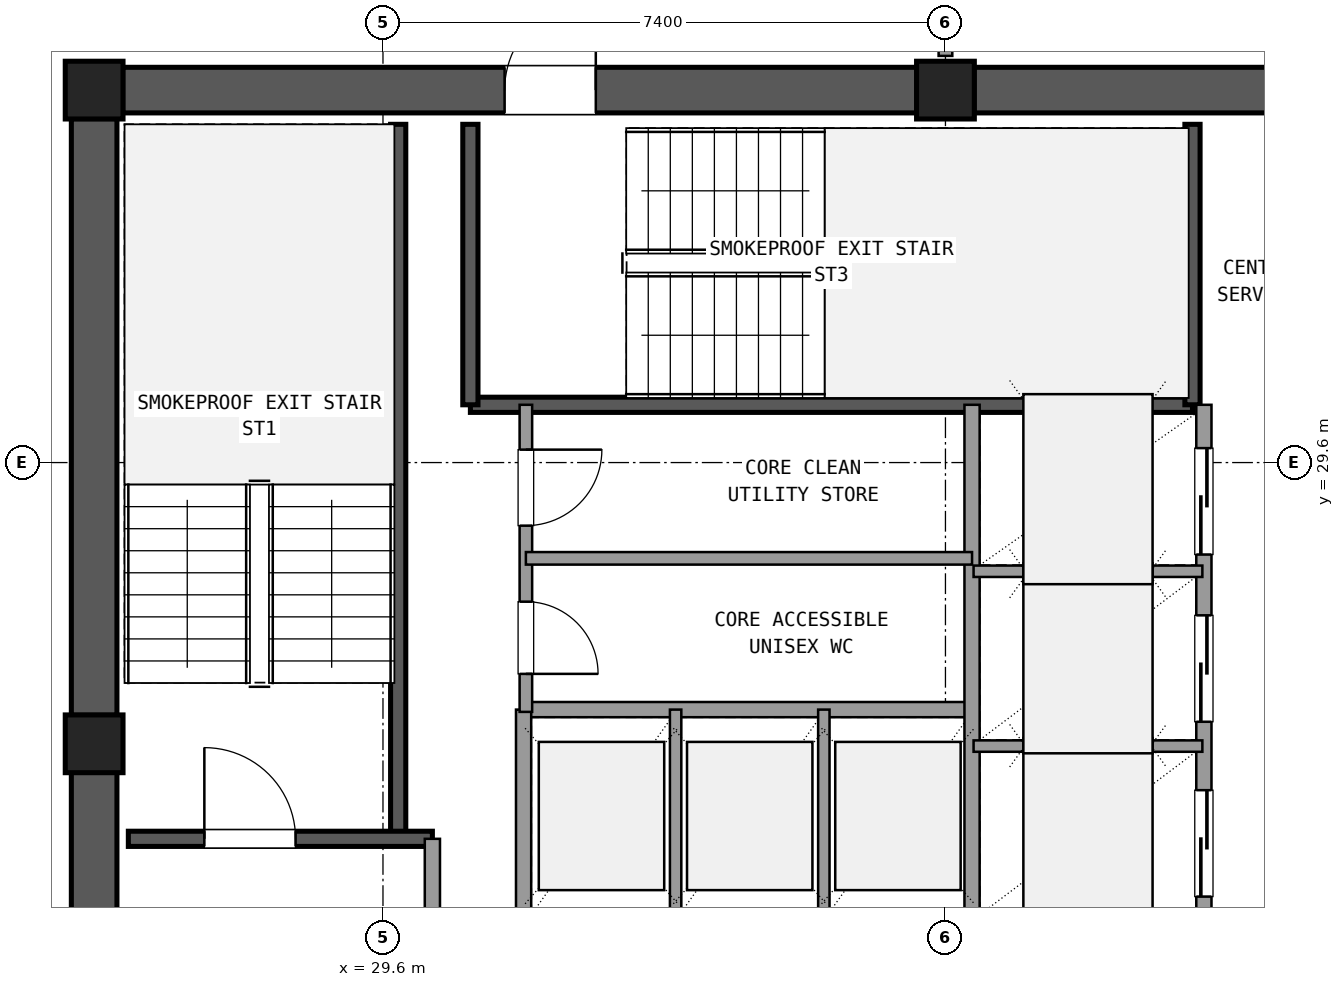
"""IFC4 building model, lengths in metres.
Left out: names, types, materials, properties, quantities, classifications, styles, units other than length and angle.
Written with IfcOpenShell. Run it as: python <this file> out.ifc"""

import sys

from ifc_helpers import new_model, si_unit, direction, frame, frame_2d, origin, origin_2d, place, context, subcontext, project, spatial, rectangle, extrude, element, fill, save


model = new_model("IFC4")
c1 = context("Model", 3, precision=1e-05, world=origin(), true_north=direction((0.0, 1.0)))
c2 = subcontext(c1, "Body", "Model", "MODEL_VIEW")
j1 = project(units=[si_unit("LENGTHUNIT", "METRE"), si_unit("PLANEANGLEUNIT", "RADIAN")], contexts=[c1])
p1 = place(None, origin())
s1 = spatial("IfcSite", under=j1, at=p1, CompositionType="ELEMENT")
p2 = place(p1, origin())
s2 = spatial("IfcBuilding", under=s1, at=p2, CompositionType="ELEMENT")
p3 = place(p2, frame((0.0, 0.0, 268.02)))
s3 = spatial("IfcBuildingStorey", under=s2, at=p3, CompositionType="ELEMENT", Elevation=268.02)
for number, where, z_axis, x_axis in (
    (1, (37.0, 34.5, 0.0), (0.0, 0.0, 1.0), (1.0, 0.0, 0.0)),
    (2, (25.8, 34.5, 0.0), (0.0, 0.0, 1.0), (1.0, 0.0, 0.0)),
    (3, (25.8, 25.9, 0.0), (0.0, 0.0, 1.0), (1.0, 0.0, 0.0)),
):
    element("IfcColumn", number, at=place(p3, frame(where, z_axis=z_axis, x_axis=x_axis)), inside=s3, PredefinedType="COLUMN", context=c2, shape_type="SweptSolid", body=[
        extrude(rectangle(XDim=0.76, YDim=0.76, at=origin_2d()), origin(), (0.0, 0.0, 1.0), 3.6),
    ])
p4 = place(p3, frame((47.825, 34.5, 0.0), z_axis=(0.0, 0.0, 1.0), x_axis=(-1.0, 0.0, 0.0)))
e4 = element("IfcWall", 4, at=p4, inside=s3, PredefinedType="SHEAR", context=c2, shape_type="SweptSolid", body=[
    extrude(rectangle(XDim=10.45, YDim=0.6, at=frame_2d((5.225, 0.0))), origin(), (0.0, 0.0, 1.0), 3.32),
])
p5 = place(p4, frame((4.725, 0.0, 0.0)))
e5 = element("IfcOpeningElement", 5, at=p5, cuts=e4, PredefinedType="OPENING", context=c2, shape_type="SweptSolid", body=[
    extrude(rectangle(XDim=1.6, YDim=2.2, at=frame_2d((0.8, 1.1))), frame((0.0, 0.31, 0.0), z_axis=(0.0, -1.0, 0.0), x_axis=(1.0, 0.0, 0.0)), (0.0, 0.0, 1.0), 0.62),
])
p6 = place(p3, frame((36.625, 34.5, 0.0), z_axis=(0.0, 0.0, 1.0), x_axis=(-1.0, 0.0, 0.0)))
e6 = element("IfcWall", 6, at=p6, inside=s3, PredefinedType="SHEAR", context=c2, shape_type="SweptSolid", body=[
    extrude(rectangle(XDim=10.45, YDim=0.6, at=frame_2d((5.225, 0.0))), origin(), (0.0, 0.0, 1.0), 3.32),
])
p7 = place(p6, frame((4.225, 0.0, 0.0)))
e7 = element("IfcOpeningElement", 7, at=p7, cuts=e6, PredefinedType="OPENING", context=c2, shape_type="SweptSolid", body=[
    extrude(rectangle(XDim=1.2, YDim=2.15, at=frame_2d((0.6, 1.075))), frame((0.0, 0.31, 0.0), z_axis=(0.0, -1.0, 0.0), x_axis=(1.0, 0.0, 0.0)), (0.0, 0.0, 1.0), 0.62),
])
p8 = place(p3, frame((25.8, 34.125, 0.0), z_axis=(0.0, 0.0, 1.0), x_axis=(0.0, -1.0, 0.0)))
e8 = element("IfcWall", 8, at=p8, inside=s3, PredefinedType="SHEAR", context=c2, shape_type="SweptSolid", body=[
    extrude(rectangle(XDim=7.85, YDim=0.6, at=frame_2d((3.925, 0.0))), origin(), (0.0, 0.0, 1.0), 3.32),
])
p9 = place(p3, frame((25.8, 25.525, 0.0), z_axis=(0.0, 0.0, 1.0), x_axis=(0.0, -1.0, 0.0)))
e9 = element("IfcWall", 9, at=p9, inside=s3, PredefinedType="SHEAR", context=c2, shape_type="SweptSolid", body=[
    extrude(rectangle(XDim=7.85, YDim=0.6, at=frame_2d((3.925, 0.0))), origin(), (0.0, 0.0, 1.0), 3.32),
])
p10 = place(p9, frame((2.275, 0.0, 0.0)))
e10 = element("IfcOpeningElement", 10, at=p10, cuts=e9, PredefinedType="OPENING", context=c2, shape_type="SweptSolid", body=[
    extrude(rectangle(XDim=1.2, YDim=2.15, at=frame_2d((0.6, 1.075))), frame((0.0, 0.31, 0.0), z_axis=(0.0, -1.0, 0.0), x_axis=(1.0, 0.0, 0.0)), (0.0, 0.0, 1.0), 0.62),
])
p11 = place(p3, frame((29.8, 24.65, 0.0), z_axis=(0.0, 0.0, 1.0), x_axis=(0.0, 1.0, 0.0)))
e11 = element("IfcWall", 11, at=p11, inside=s3, PredefinedType="SHEAR", context=c2, shape_type="SweptSolid", body=[
    extrude(rectangle(XDim=9.4, YDim=0.2, at=frame_2d((4.7, 0.0))), origin(), (0.0, 0.0, 1.0), 3.32),
])
p12 = place(p3, frame((26.25, 24.65, 0.0), z_axis=(0.0, 0.0, 1.0), x_axis=(1.0, 0.0, 0.0)))
e12 = element("IfcWall", 12, at=p12, inside=s3, PredefinedType="SHEAR", context=c2, shape_type="SweptSolid", body=[
    extrude(rectangle(XDim=4.0, YDim=0.2, at=frame_2d((2.0, 0.0))), origin(), (0.0, 0.0, 1.0), 3.32),
])
p13 = place(p12, frame((1.0, 0.0, 0.0)))
e13 = element("IfcOpeningElement", 13, at=p13, cuts=e12, PredefinedType="OPENING", context=c2, shape_type="SweptSolid", body=[
    extrude(rectangle(XDim=1.2, YDim=2.15, at=frame_2d((0.6, 1.075))), frame((0.0, 0.11, 0.0), z_axis=(0.0, -1.0, 0.0), x_axis=(1.0, 0.0, 0.0)), (0.0, 0.0, 1.0), 0.22),
])
p14 = place(p3, frame((30.75, 30.36, 0.0), z_axis=(0.0, 0.0, 1.0), x_axis=(1.0, 0.0, 0.0)))
e14 = element("IfcWall", 14, at=p14, inside=s3, PredefinedType="SHEAR", context=c2, shape_type="SweptSolid", body=[
    extrude(rectangle(XDim=9.5, YDim=0.2, at=frame_2d((4.75, 0.0))), origin(), (0.0, 0.0, 1.0), 3.32),
])
for number, where, z_axis, x_axis in (
    (15, (30.75, 30.36, 0.0), (0.0, 0.0, 1.0), (0.0, 1.0, 0.0)),
    (16, (40.25, 30.36, 0.0), (0.0, 0.0, 1.0), (0.0, 1.0, 0.0)),
):
    element("IfcWall", number, at=place(p3, frame(where, z_axis=z_axis, x_axis=x_axis)), inside=s3, PredefinedType="SHEAR", context=c2, shape_type="SweptSolid", body=[
        extrude(rectangle(XDim=3.69, YDim=0.2, at=frame_2d((1.845, 0.0))), origin(), (0.0, 0.0, 1.0), 3.32),
    ])
p15 = place(p3, frame((30.25, 17.75, 0.0), z_axis=(0.0, 0.0, 1.0), x_axis=(0.0, 1.0, 0.0)))
e17 = element("IfcWall", 17, at=p15, inside=s3, PredefinedType="SOLIDWALL", context=c2, shape_type="SweptSolid", body=[
    extrude(rectangle(XDim=6.9, YDim=0.2, at=frame_2d((3.45, 0.0))), origin(), (0.0, 0.0, 1.0), 2.61),
])
p16 = place(p15, frame((4.15, 0.0, 0.0)))
e18 = element("IfcOpeningElement", 18, at=p16, cuts=e17, PredefinedType="OPENING", context=c2, shape_type="SweptSolid", body=[
    extrude(rectangle(XDim=1.2, YDim=2.15, at=frame_2d((0.6, 1.075))), frame((0.0, 0.11, 0.0), z_axis=(0.0, -1.0, 0.0), x_axis=(1.0, 0.0, 0.0)), (0.0, 0.0, 1.0), 0.22),
])
p17 = place(p3, frame((31.45, 26.35, 0.0), z_axis=(0.0, 0.0, 1.0), x_axis=(1.0, 0.0, 0.0)))
e19 = element("IfcWall", 19, at=p17, inside=s3, PredefinedType="SOLIDWALL", context=c2, shape_type="SweptSolid", body=[
    extrude(rectangle(XDim=5.9, YDim=0.2, at=frame_2d((2.95, 0.0))), origin(), (0.0, 0.0, 1.0), 2.61),
])
p18 = place(p3, frame((31.45, 23.54, 0.0), z_axis=(0.0, 0.0, 1.0), x_axis=(0.0, 1.0, 0.0)))
e20 = element("IfcWall", 20, at=p18, inside=s3, PredefinedType="SOLIDWALL", context=c2, shape_type="SweptSolid", body=[
    extrude(rectangle(XDim=2.81, YDim=0.2, at=frame_2d((1.405, 0.0))), origin(), (0.0, 0.0, 1.0), 2.61),
])
for number, where, z_axis, x_axis in (
    (21, (33.45, 23.54, 0.0), (0.0, 0.0, 1.0), (0.0, 1.0, 0.0)),
    (22, (35.4, 23.54, 0.0), (0.0, 0.0, 1.0), (0.0, 1.0, 0.0)),
):
    element("IfcWall", number, at=place(p3, frame(where, z_axis=z_axis, x_axis=x_axis)), inside=s3, PredefinedType="PARTITIONING", context=c2, shape_type="SweptSolid", body=[
        extrude(rectangle(XDim=2.81, YDim=0.15, at=frame_2d((1.405, 0.0))), origin(), (0.0, 0.0, 1.0), 2.61),
    ])
p19 = place(p3, frame((37.35, 23.54, 0.0), z_axis=(0.0, 0.0, 1.0), x_axis=(0.0, 1.0, 0.0)))
e23 = element("IfcWall", 23, at=p19, inside=s3, PredefinedType="SOLIDWALL", context=c2, shape_type="SweptSolid", body=[
    extrude(rectangle(XDim=6.82, YDim=0.2, at=frame_2d((3.41, 0.0))), origin(), (0.0, 0.0, 1.0), 2.61),
])
p20 = place(p3, frame((40.4, 23.54, 0.0), z_axis=(0.0, 0.0, 1.0), x_axis=(0.0, 1.0, 0.0)))
e24 = element("IfcWall", 24, at=p20, inside=s3, PredefinedType="SOLIDWALL", context=c2, shape_type="SweptSolid", body=[
    extrude(rectangle(XDim=6.82, YDim=0.2, at=frame_2d((3.41, 0.0))), origin(), (0.0, 0.0, 1.0), 2.61),
])
p21 = place(p20, frame((0.35, 0.0, 0.0)))
e25 = element("IfcOpeningElement", 25, at=p21, cuts=e24, PredefinedType="OPENING", context=c2, shape_type="SweptSolid", body=[
    extrude(rectangle(XDim=1.4, YDim=2.2, at=frame_2d((0.7, 1.1))), frame((0.0, 0.11, 0.0), z_axis=(0.0, -1.0, 0.0), x_axis=(1.0, 0.0, 0.0)), (0.0, 0.0, 1.0), 0.22),
])
p22 = place(p20, frame((2.65, 0.0, 0.0)))
e26 = element("IfcOpeningElement", 26, at=p22, cuts=e24, PredefinedType="OPENING", context=c2, shape_type="SweptSolid", body=[
    extrude(rectangle(XDim=1.4, YDim=2.2, at=frame_2d((0.7, 1.1))), frame((0.0, 0.11, 0.0), z_axis=(0.0, -1.0, 0.0), x_axis=(1.0, 0.0, 0.0)), (0.0, 0.0, 1.0), 0.22),
])
p23 = place(p20, frame((4.85, 0.0, 0.0)))
e27 = element("IfcOpeningElement", 27, at=p23, cuts=e24, PredefinedType="OPENING", context=c2, shape_type="SweptSolid", body=[
    extrude(rectangle(XDim=1.4, YDim=2.2, at=frame_2d((0.7, 1.1))), frame((0.0, 0.11, 0.0), z_axis=(0.0, -1.0, 0.0), x_axis=(1.0, 0.0, 0.0)), (0.0, 0.0, 1.0), 0.22),
])
for number, where, z_axis, x_axis in (
    (28, (37.37, 25.87, 0.0), (0.0, 0.0, 1.0), (1.0, 0.0, 0.0)),
    (29, (37.37, 28.17, 0.0), (0.0, 0.0, 1.0), (1.0, 0.0, 0.0)),
):
    element("IfcWall", number, at=place(p3, frame(where, z_axis=z_axis, x_axis=x_axis)), inside=s3, PredefinedType="PARTITIONING", context=c2, shape_type="SweptSolid", body=[
        extrude(rectangle(XDim=3.01, YDim=0.15, at=frame_2d((1.505, 0.0))), origin(), (0.0, 0.0, 1.0), 2.61),
    ])
p24 = place(p3, frame((31.48, 26.32, 0.0), z_axis=(0.0, 0.0, 1.0), x_axis=(0.0, 1.0, 0.0)))
e30 = element("IfcWall", 30, at=p24, inside=s3, PredefinedType="PLUMBINGWALL", context=c2, shape_type="SweptSolid", body=[
    extrude(rectangle(XDim=4.04, YDim=0.165, at=frame_2d((2.02, 0.0))), origin(), (0.0, 0.0, 1.0), 2.61),
])
p25 = place(p24, frame((0.5, 0.0, 0.0)))
e31 = element("IfcOpeningElement", 31, at=p25, cuts=e30, PredefinedType="OPENING", context=c2, shape_type="SweptSolid", body=[
    extrude(rectangle(XDim=0.95, YDim=2.1, at=frame_2d((0.475, 1.05))), frame((0.0, 0.093, 0.0), z_axis=(0.0, -1.0, 0.0), x_axis=(1.0, 0.0, 0.0)), (0.0, 0.0, 1.0), 0.185),
])
p26 = place(p24, frame((2.45, 0.0, 0.0)))
e32 = element("IfcOpeningElement", 32, at=p26, cuts=e30, PredefinedType="OPENING", context=c2, shape_type="SweptSolid", body=[
    extrude(rectangle(XDim=1.0, YDim=2.15, at=frame_2d((0.5, 1.075))), frame((0.0, 0.093, 0.0), z_axis=(0.0, -1.0, 0.0), x_axis=(1.0, 0.0, 0.0)), (0.0, 0.0, 1.0), 0.185),
])
p27 = place(p3, frame((31.48, 28.34, 0.0), z_axis=(0.0, 0.0, 1.0), x_axis=(1.0, 0.0, 0.0)))
e33 = element("IfcWall", 33, at=p27, inside=s3, PredefinedType="PLUMBINGWALL", context=c2, shape_type="SweptSolid", body=[
    extrude(rectangle(XDim=5.87, YDim=0.165, at=frame_2d((2.935, 0.0))), origin(), (0.0, 0.0, 1.0), 2.61),
])
p28 = place(p3, frame((37.0, 34.95, 0.0), z_axis=(0.0, 0.0, 1.0), x_axis=(0.0, 1.0, 0.0)))
e34 = element("IfcWall", 34, at=p28, inside=s3, PredefinedType="PARTITIONING", context=c2, shape_type="SweptSolid", body=[
    extrude(rectangle(XDim=2.7, YDim=0.18, at=frame_2d((1.35, 0.0))), origin(), (0.0, 0.0, 1.0), 2.61),
])
p29 = place(p28, frame((0.35, 0.0, 0.0)))
e35 = element("IfcOpeningElement", 35, at=p29, cuts=e34, PredefinedType="OPENING", context=c2, shape_type="SweptSolid", body=[
    extrude(rectangle(XDim=2.0, YDim=2.2, at=frame_2d((1.0, 1.1))), frame((0.0, 0.1, 0.0), z_axis=(0.0, -1.0, 0.0), x_axis=(1.0, 0.0, 0.0)), (0.0, 0.0, 1.0), 0.2),
])
p30 = place(p13, origin())
e36 = element("IfcDoor", 36, at=p30, inside=s3, OperationType="SINGLE_SWING_LEFT", PredefinedType="DOOR", context=c2, shape_type="SweptSolid", body=[
    extrude(rectangle(XDim=1.2, YDim=2.15, at=frame_2d((0.6, 1.075))), frame((0.0, 0.025, 0.0), z_axis=(0.0, -1.0, 0.0), x_axis=(1.0, 0.0, 0.0)), (0.0, 0.0, 1.0), 0.05),
])
fill(e13, e36)
p31 = place(p7, frame((1.2, 0.0, 0.0), z_axis=(0.0, 0.0, 1.0), x_axis=(-1.0, 0.0, 0.0)))
e37 = element("IfcDoor", 37, at=p31, inside=s3, OperationType="SINGLE_SWING_LEFT", PredefinedType="DOOR", context=c2, shape_type="SweptSolid", body=[
    extrude(rectangle(XDim=1.2, YDim=2.15, at=frame_2d((0.6, 1.075))), frame((0.0, 0.025, 0.0), z_axis=(0.0, -1.0, 0.0), x_axis=(1.0, 0.0, 0.0)), (0.0, 0.0, 1.0), 0.05),
])
fill(e7, e37)
p32 = place(p21, origin())
e38 = element("IfcDoor", 38, at=p32, inside=s3, OperationType="SLIDING_TO_LEFT", PredefinedType="DOOR", context=c2, shape_type="SweptSolid", body=[
    extrude(rectangle(XDim=1.4, YDim=2.2, at=frame_2d((0.7, 1.1))), frame((0.0, 0.025, 0.0), z_axis=(0.0, -1.0, 0.0), x_axis=(1.0, 0.0, 0.0)), (0.0, 0.0, 1.0), 0.05),
])
fill(e25, e38)
p33 = place(p22, origin())
e39 = element("IfcDoor", 39, at=p33, inside=s3, OperationType="SLIDING_TO_LEFT", PredefinedType="DOOR", context=c2, shape_type="SweptSolid", body=[
    extrude(rectangle(XDim=1.4, YDim=2.2, at=frame_2d((0.7, 1.1))), frame((0.0, 0.025, 0.0), z_axis=(0.0, -1.0, 0.0), x_axis=(1.0, 0.0, 0.0)), (0.0, 0.0, 1.0), 0.05),
])
fill(e26, e39)
p34 = place(p23, origin())
e40 = element("IfcDoor", 40, at=p34, inside=s3, OperationType="SLIDING_TO_RIGHT", PredefinedType="DOOR", context=c2, shape_type="SweptSolid", body=[
    extrude(rectangle(XDim=1.4, YDim=2.2, at=frame_2d((0.7, 1.1))), frame((0.0, 0.025, 0.0), z_axis=(0.0, -1.0, 0.0), x_axis=(1.0, 0.0, 0.0)), (0.0, 0.0, 1.0), 0.05),
])
fill(e27, e40)
p35 = place(p25, frame((0.95, 0.0, 0.0), z_axis=(0.0, 0.0, 1.0), x_axis=(-1.0, 0.0, 0.0)))
e41 = element("IfcDoor", 41, at=p35, inside=s3, OperationType="SINGLE_SWING_LEFT", PredefinedType="DOOR", context=c2, shape_type="SweptSolid", body=[
    extrude(rectangle(XDim=0.95, YDim=2.1, at=frame_2d((0.475, 1.05))), frame((0.0, 0.025, 0.0), z_axis=(0.0, -1.0, 0.0), x_axis=(1.0, 0.0, 0.0)), (0.0, 0.0, 1.0), 0.05),
])
fill(e31, e41)
p36 = place(p26, frame((1.0, 0.0, 0.0), z_axis=(0.0, 0.0, 1.0), x_axis=(-1.0, 0.0, 0.0)))
e42 = element("IfcDoor", 42, at=p36, inside=s3, OperationType="SINGLE_SWING_RIGHT", PredefinedType="DOOR", context=c2, shape_type="SweptSolid", body=[
    extrude(rectangle(XDim=1.0, YDim=2.15, at=frame_2d((0.5, 1.075))), frame((0.0, 0.025, 0.0), z_axis=(0.0, -1.0, 0.0), x_axis=(1.0, 0.0, 0.0)), (0.0, 0.0, 1.0), 0.05),
])
fill(e32, e42)
save(model, sys.argv[1])
